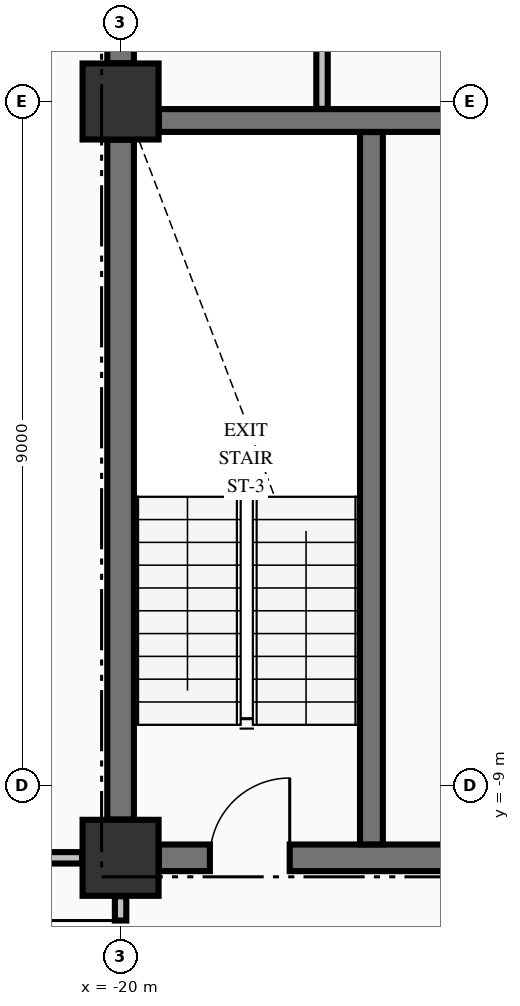
"""IFC4 building model, lengths in metres.
Left out: names, types, materials, properties, quantities, classifications, styles, units other than length and angle.
Written with IfcOpenShell. Run it as: python <this file> out.ifc"""

import sys

from ifc_helpers import new_model, si_unit, direction, frame, frame_2d, origin, origin_2d, place, context, subcontext, project, spatial, rectangle, extrude, element, fill, save


model = new_model("IFC4")
c1 = context("Model", 3, precision=1e-05, world=origin(), true_north=direction((0.0, 1.0)))
c2 = subcontext(c1, "Body", "Model", "MODEL_VIEW")
j1 = project(units=[si_unit("LENGTHUNIT", "METRE"), si_unit("PLANEANGLEUNIT", "RADIAN")], contexts=[c1])
p1 = place(None, origin())
s1 = spatial("IfcSite", under=j1, at=p1, CompositionType="ELEMENT")
p2 = place(p1, origin())
s2 = spatial("IfcBuilding", under=s1, at=p2, CompositionType="ELEMENT")
p3 = place(p2, frame((0.0, 0.0, 124.92)))
s3 = spatial("IfcBuildingStorey", under=s2, at=p3, CompositionType="ELEMENT", Elevation=124.92)
for number, where, z_axis, x_axis in (
    (1, (-20.0, -9.95, -0.25), (0.0, 0.0, 1.0), (1.0, 0.0, 0.0)),
    (2, (-20.0, 0.0, -0.25), (0.0, 0.0, 1.0), (1.0, 0.0, 0.0)),
):
    element("IfcColumn", number, at=place(p3, frame(where, z_axis=z_axis, x_axis=x_axis)), inside=s3, PredefinedType="COLUMN", context=c2, shape_type="SweptSolid", body=[
        extrude(rectangle(XDim=1.0, YDim=1.0, at=origin_2d()), origin(), (0.0, 0.0, 1.0), 3.57),
    ])
p4 = place(p3, frame((-19.496, -9.95, 0.0), z_axis=(0.0, 0.0, 1.0), x_axis=(1.0, 0.0, 0.0)))
e3 = element("IfcWall", 3, at=p4, inside=s3, PredefinedType="SHEAR", context=c2, shape_type="SweptSolid", body=[
    extrude(rectangle(XDim=4.796, YDim=0.35, at=frame_2d((2.398, 0.0))), origin(), (0.0, 0.0, 1.0), 3.32),
])
p5 = place(p4, frame((0.671, 0.0, 0.0)))
e4 = element("IfcOpeningElement", 4, at=p5, cuts=e3, PredefinedType="OPENING", context=c2, shape_type="SweptSolid", body=[
    extrude(rectangle(XDim=1.05, YDim=2.15, at=frame_2d((0.525, 1.075))), frame((0.0, 0.185, 0.0), z_axis=(0.0, -1.0, 0.0), x_axis=(1.0, 0.0, 0.0)), (0.0, 0.0, 1.0), 0.37),
])
p6 = place(p3, frame((-19.496, -0.25, 0.0), z_axis=(0.0, 0.0, 1.0), x_axis=(1.0, 0.0, 0.0)))
e5 = element("IfcWall", 5, at=p6, inside=s3, PredefinedType="SHEAR", context=c2, shape_type="SweptSolid", body=[
    extrude(rectangle(XDim=7.992, YDim=0.3, at=frame_2d((3.996, 0.0))), origin(), (0.0, 0.0, 1.0), 3.32),
])
p7 = place(p6, frame((5.796, 0.0, 0.0)))
e6 = element("IfcOpeningElement", 6, at=p7, cuts=e5, PredefinedType="OPENING", context=c2, shape_type="SweptSolid", body=[
    extrude(rectangle(XDim=1.1, YDim=2.15, at=frame_2d((0.55, 1.075))), frame((0.0, 0.16, 0.0), z_axis=(0.0, -1.0, 0.0), x_axis=(1.0, 0.0, 0.0)), (0.0, 0.0, 1.0), 0.32),
])
p8 = place(p3, frame((-27.835, -9.95, 0.0), z_axis=(0.0, 0.0, 1.0), x_axis=(1.0, 0.0, 0.0)))
e7 = element("IfcWall", 7, at=p8, inside=s3, PredefinedType="PARTITIONING", context=c2, shape_type="SweptSolid", body=[
    extrude(rectangle(XDim=7.329, YDim=0.15, at=frame_2d((3.665, 0.0))), origin(), (0.0, 0.0, 1.0), 3.32),
])
p9 = place(p8, frame((3.335, 0.0, 0.0)))
e8 = element("IfcOpeningElement", 8, at=p9, cuts=e7, PredefinedType="OPENING", context=c2, shape_type="SweptSolid", body=[
    extrude(rectangle(XDim=1.0, YDim=2.15, at=frame_2d((0.5, 1.075))), frame((0.0, 0.085, 0.0), z_axis=(0.0, -1.0, 0.0), x_axis=(1.0, 0.0, 0.0)), (0.0, 0.0, 1.0), 0.17),
])
p10 = place(p3, frame((-20.0, -9.446, 0.0), z_axis=(0.0, 0.0, 1.0), x_axis=(0.0, 1.0, 0.0)))
e9 = element("IfcWall", 9, at=p10, inside=s3, PredefinedType="SHEAR", context=c2, shape_type="SweptSolid", body=[
    extrude(rectangle(XDim=8.942, YDim=0.35, at=frame_2d((4.471, 0.0))), origin(), (0.0, 0.0, 1.0), 3.32),
])
p11 = place(p3, frame((-20.0, 0.504, 0.0), z_axis=(0.0, 0.0, 1.0), x_axis=(0.0, 1.0, 0.0)))
e10 = element("IfcWall", 10, at=p11, inside=s3, PredefinedType="SHEAR", context=c2, shape_type="SweptSolid", body=[
    extrude(rectangle(XDim=9.492, YDim=0.35, at=frame_2d((4.746, 0.0))), origin(), (0.0, 0.0, 1.0), 3.32),
])
p12 = place(p3, frame((-16.7, -9.773, 0.0), z_axis=(0.0, 0.0, 1.0), x_axis=(0.0, 1.0, 0.0)))
e11 = element("IfcWall", 11, at=p12, inside=s3, PredefinedType="SHEAR", context=c2, shape_type="SweptSolid", body=[
    extrude(rectangle(XDim=9.371, YDim=0.3, at=frame_2d((4.686, 0.0))), origin(), (0.0, 0.0, 1.0), 3.32),
])
p13 = place(p3, frame((-20.0, -12.472, 0.0), z_axis=(0.0, 0.0, 1.0), x_axis=(0.0, 1.0, 0.0)))
e12 = element("IfcWall", 12, at=p13, inside=s3, PredefinedType="PARTITIONING", context=c2, shape_type="SweptSolid", body=[
    extrude(rectangle(XDim=2.016, YDim=0.15, at=frame_2d((1.008, 0.0))), origin(), (0.0, 0.0, 1.0), 2.81),
])
p14 = place(p13, frame((0.747, 0.0, 0.0)))
e13 = element("IfcOpeningElement", 13, at=p14, cuts=e12, PredefinedType="OPENING", context=c2, shape_type="SweptSolid", body=[
    extrude(rectangle(XDim=0.95, YDim=2.15, at=frame_2d((0.475, 1.075))), frame((0.0, 0.085, 0.0), z_axis=(0.0, -1.0, 0.0), x_axis=(1.0, 0.0, 0.0)), (0.0, 0.0, 1.0), 0.17),
])
p15 = place(p3, frame((-17.35, -0.097, 0.0), z_axis=(0.0, 0.0, 1.0), x_axis=(0.0, 1.0, 0.0)))
e14 = element("IfcWall", 14, at=p15, inside=s3, PredefinedType="PARTITIONING", context=c2, shape_type="SweptSolid", body=[
    extrude(rectangle(XDim=10.419, YDim=0.15, at=frame_2d((5.209, 0.0))), origin(), (0.0, 0.0, 1.0), 3.32),
])
p16 = place(p5, origin())
e15 = element("IfcDoor", 15, at=p16, inside=s3, OperationType="SINGLE_SWING_RIGHT", PredefinedType="DOOR", context=c2, shape_type="SweptSolid", body=[
    extrude(rectangle(XDim=1.05, YDim=2.15, at=frame_2d((0.525, 1.075))), frame((0.0, 0.025, 0.0), z_axis=(0.0, -1.0, 0.0), x_axis=(1.0, 0.0, 0.0)), (0.0, 0.0, 1.0), 0.05),
])
fill(e4, e15)
p17 = place(p14, origin())
e16 = element("IfcDoor", 16, at=p17, inside=s3, OperationType="SINGLE_SWING_RIGHT", PredefinedType="DOOR", context=c2, shape_type="SweptSolid", body=[
    extrude(rectangle(XDim=0.95, YDim=2.15, at=frame_2d((0.475, 1.075))), frame((0.0, 0.025, 0.0), z_axis=(0.0, -1.0, 0.0), x_axis=(1.0, 0.0, 0.0)), (0.0, 0.0, 1.0), 0.05),
])
fill(e13, e16)
save(model, sys.argv[1])
